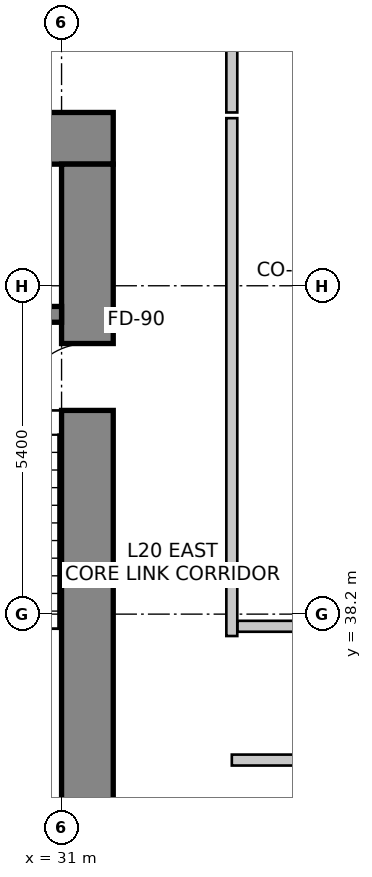
"""IFC4 building model, lengths in metres.
Left out: names, types, materials, properties, quantities, classifications, styles, units other than length and angle.
Written with IfcOpenShell. Run it as: python <this file> out.ifc"""

import sys

from ifc_helpers import new_model, si_unit, direction, frame, frame_2d, origin, place, context, subcontext, project, spatial, rectangle, extrude, source, transform, mapped, element, fill, save


model = new_model("IFC4")
c1 = context("Model", 3, precision=1e-05, world=origin(), true_north=direction((0.0, 1.0)))
c2 = subcontext(c1, "Body", "Model", "MODEL_VIEW")
j1 = project(units=[si_unit("LENGTHUNIT", "METRE"), si_unit("PLANEANGLEUNIT", "RADIAN")], contexts=[c1])
p1 = place(None, origin())
s1 = spatial("IfcSite", under=j1, at=p1, CompositionType="ELEMENT")
p2 = place(p1, origin())
s2 = spatial("IfcBuilding", under=s1, at=p2, CompositionType="ELEMENT")
p3 = place(p2, frame((0.0, 0.0, 83.0)))
s3 = spatial("IfcBuildingStorey", under=s2, at=p3, CompositionType="ELEMENT", Elevation=83.0)
p4 = place(p3, frame((15.75, 46.025, 0.0), z_axis=(0.0, 0.0, 1.0), x_axis=(1.0, 0.0, 0.0)))
e1 = element("IfcWall", 1, at=p4, inside=s3, PredefinedType="SHEAR", context=c2, shape_type="SweptSolid", body=[
    extrude(rectangle(XDim=16.1, YDim=0.85, at=frame_2d((8.05, 0.0))), origin(), (0.0, 0.0, 1.0), 4.0),
])
p5 = place(p3, frame((31.425, 34.2, 0.0), z_axis=(0.0, 0.0, 1.0), x_axis=(0.0, 1.0, 0.0)))
e2 = element("IfcWall", 2, at=p5, inside=s3, PredefinedType="SHEAR", context=c2, shape_type="SweptSolid", body=[
    extrude(rectangle(XDim=11.4, YDim=0.85, at=frame_2d((5.7, 0.0))), origin(), (0.0, 0.0, 1.0), 4.0),
])
m1 = source(origin(), c2, "Body", "SweptSolid", [
    extrude(rectangle(XDim=1.1, YDim=2.15, at=frame_2d((0.55, 1.075))), frame((0.0, 0.435, 0.0), z_axis=(0.0, -1.0, 0.0), x_axis=(1.0, 0.0, 0.0)), (0.0, 0.0, 1.0), 0.87),
])
p6 = place(p5, frame((7.35, 0.0, 0.0)))
e3 = element("IfcOpeningElement", 3, at=p6, cuts=e2, PredefinedType="OPENING", context=c2, shape_type="MappedRepresentation", body=[
    mapped(m1, transform((0.0, 0.0, 0.0), scale=1.0)),
])
p7 = place(p3, frame((27.5, 43.13, 0.0), z_axis=(0.0, 0.0, 1.0), x_axis=(1.0, 0.0, 0.0)))
e4 = element("IfcWall", 4, at=p7, inside=s3, PredefinedType="SHEAR", context=c2, shape_type="SweptSolid", body=[
    extrude(rectangle(XDim=3.5, YDim=0.26, at=frame_2d((1.75, 0.0))), origin(), (0.0, 0.0, 1.0), 4.0),
])
p8 = place(p3, frame((53.961, 47.417, 0.0), z_axis=(0.0, 0.0, 1.0), x_axis=(-0.985865713455, 0.167537443678, 0.0)))
e5 = element("IfcWall", 5, at=p8, inside=s3, PredefinedType="SOLIDWALL", context=c2, shape_type="SweptSolid", body=[
    extrude(rectangle(XDim=32.537, YDim=0.3, at=frame_2d((16.269, 0.0))), origin(), (0.0, 0.0, 1.0), 3.75),
])
m2 = source(origin(), c2, "Body", "SweptSolid", [
    extrude(rectangle(XDim=2.4, YDim=2.2, at=frame_2d((1.2, 1.1))), frame((0.0, 0.16, 0.0), z_axis=(0.0, -1.0, 0.0), x_axis=(1.0, 0.0, 0.0)), (0.0, 0.0, 1.0), 0.32),
])
p9 = place(p8, frame((0.375, 0.0, 0.85)))
e6 = element("IfcOpeningElement", 6, at=p9, cuts=e5, PredefinedType="OPENING", context=c2, shape_type="MappedRepresentation", body=[
    mapped(m2, transform((0.0, 0.0, 0.0), scale=1.0)),
])
m3 = source(origin(), c2, "Body", "SweptSolid", [
    extrude(rectangle(XDim=2.8, YDim=2.4, at=frame_2d((1.4, 1.2))), frame((0.0, 0.16, 0.0), z_axis=(0.0, -1.0, 0.0), x_axis=(1.0, 0.0, 0.0)), (0.0, 0.0, 1.0), 0.32),
])
p10 = place(p8, frame((3.822, 0.0, 0.85)))
e7 = element("IfcOpeningElement", 7, at=p10, cuts=e5, PredefinedType="OPENING", context=c2, shape_type="MappedRepresentation", body=[
    mapped(m3, transform((0.0, 0.0, 0.0), scale=1.0)),
])
p11 = place(p8, frame((8.168, 0.0, 0.85)))
e8 = element("IfcOpeningElement", 8, at=p11, cuts=e5, PredefinedType="OPENING", context=c2, shape_type="MappedRepresentation", body=[
    mapped(m3, transform((0.0, 0.0, 0.0), scale=1.0)),
])
p12 = place(p8, frame((12.513, 0.0, 0.85)))
e9 = element("IfcOpeningElement", 9, at=p12, cuts=e5, PredefinedType="OPENING", context=c2, shape_type="MappedRepresentation", body=[
    mapped(m3, transform((0.0, 0.0, 0.0), scale=1.0)),
])
p13 = place(p8, frame((18.36, 0.0, 0.85)))
e10 = element("IfcOpeningElement", 10, at=p13, cuts=e5, PredefinedType="OPENING", context=c2, shape_type="MappedRepresentation", body=[
    mapped(m3, transform((0.0, 0.0, 0.0), scale=1.0)),
])
p14 = place(p8, frame((24.895, 0.0, 0.85)))
e11 = element("IfcOpeningElement", 11, at=p14, cuts=e5, PredefinedType="OPENING", context=c2, shape_type="MappedRepresentation", body=[
    mapped(m3, transform((0.0, 0.0, 0.0), scale=1.0)),
])
p15 = place(p8, frame((29.395, 0.0, 0.85)))
e12 = element("IfcOpeningElement", 12, at=p15, cuts=e5, PredefinedType="OPENING", context=c2, shape_type="MappedRepresentation", body=[
    mapped(m3, transform((0.0, 0.0, 0.0), scale=1.0)),
])
p16 = place(p3, frame((33.8, 48.6, 0.0), z_axis=(0.0, 0.0, 1.0), x_axis=(0.0, -1.0, 0.0)))
e13 = element("IfcWall", 13, at=p16, inside=s3, PredefinedType="PARTITIONING", context=c2, shape_type="SweptSolid", body=[
    extrude(rectangle(XDim=2.15, YDim=0.18, at=frame_2d((1.075, 0.0))), origin(), (0.0, 0.0, 1.0), 2.892),
])
p17 = place(p3, frame((33.8, 46.356, 0.0), z_axis=(0.0, 0.0, 1.0), x_axis=(0.0, -1.0, 0.0)))
e14 = element("IfcWall", 14, at=p17, inside=s3, PredefinedType="PARTITIONING", context=c2, shape_type="SweptSolid", body=[
    extrude(rectangle(XDim=8.516, YDim=0.18, at=frame_2d((4.258, 0.0))), origin(), (0.0, 0.0, 1.0), 3.322),
])
p18 = place(p3, frame((33.894, 38.0, 0.0), z_axis=(0.0, 0.0, 1.0), x_axis=(1.0, 0.0, 0.0)))
e15 = element("IfcWall", 15, at=p18, inside=s3, PredefinedType="PARTITIONING", context=c2, shape_type="SweptSolid", body=[
    extrude(rectangle(XDim=4.35, YDim=0.18, at=frame_2d((2.175, 0.0))), origin(), (0.0, 0.0, 1.0), 3.434),
])
m4 = source(origin(), c2, "Body", "SweptSolid", [
    extrude(rectangle(XDim=0.9, YDim=2.15, at=frame_2d((0.45, 1.075))), frame((0.0, 0.1, 0.0), z_axis=(0.0, -1.0, 0.0), x_axis=(1.0, 0.0, 0.0)), (0.0, 0.0, 1.0), 0.2),
])
p19 = place(p18, frame((1.725, 0.0, 0.0)))
e16 = element("IfcOpeningElement", 16, at=p19, cuts=e15, PredefinedType="OPENING", context=c2, shape_type="MappedRepresentation", body=[
    mapped(m4, transform((0.0, 0.0, 0.0), scale=1.0)),
])
p20 = place(p3, frame((50.841, 35.8, 0.0), z_axis=(0.0, 0.0, 1.0), x_axis=(-1.0, 0.0, 0.0)))
e17 = element("IfcWall", 17, at=p20, inside=s3, PredefinedType="PARTITIONING", context=c2, shape_type="SweptSolid", body=[
    extrude(rectangle(XDim=17.041, YDim=0.18, at=frame_2d((8.521, 0.0))), origin(), (0.0, 0.0, 1.0), 3.125),
])
p21 = place(p20, frame((8.01, 0.0, 0.0)))
e18 = element("IfcOpeningElement", 18, at=p21, cuts=e17, PredefinedType="OPENING", context=c2, shape_type="MappedRepresentation", body=[
    mapped(m4, transform((0.0, 0.0, 0.0), scale=1.0)),
])
m5 = source(origin(), c2, "Body", "SweptSolid", [
    extrude(rectangle(XDim=1.1, YDim=2.15, at=frame_2d((0.55, 1.075))), frame((0.0, 0.025, 0.0), z_axis=(0.0, -1.0, 0.0), x_axis=(1.0, 0.0, 0.0)), (0.0, 0.0, 1.0), 0.05),
])
p22 = place(p6, origin())
e19 = element("IfcDoor", 19, at=p22, inside=s3, OperationType="SINGLE_SWING_LEFT", PredefinedType="DOOR", context=c2, shape_type="MappedRepresentation", body=[
    mapped(m5, transform((0.0, 0.0, 0.0), scale=1.0)),
])
fill(e3, e19)
save(model, sys.argv[1])
